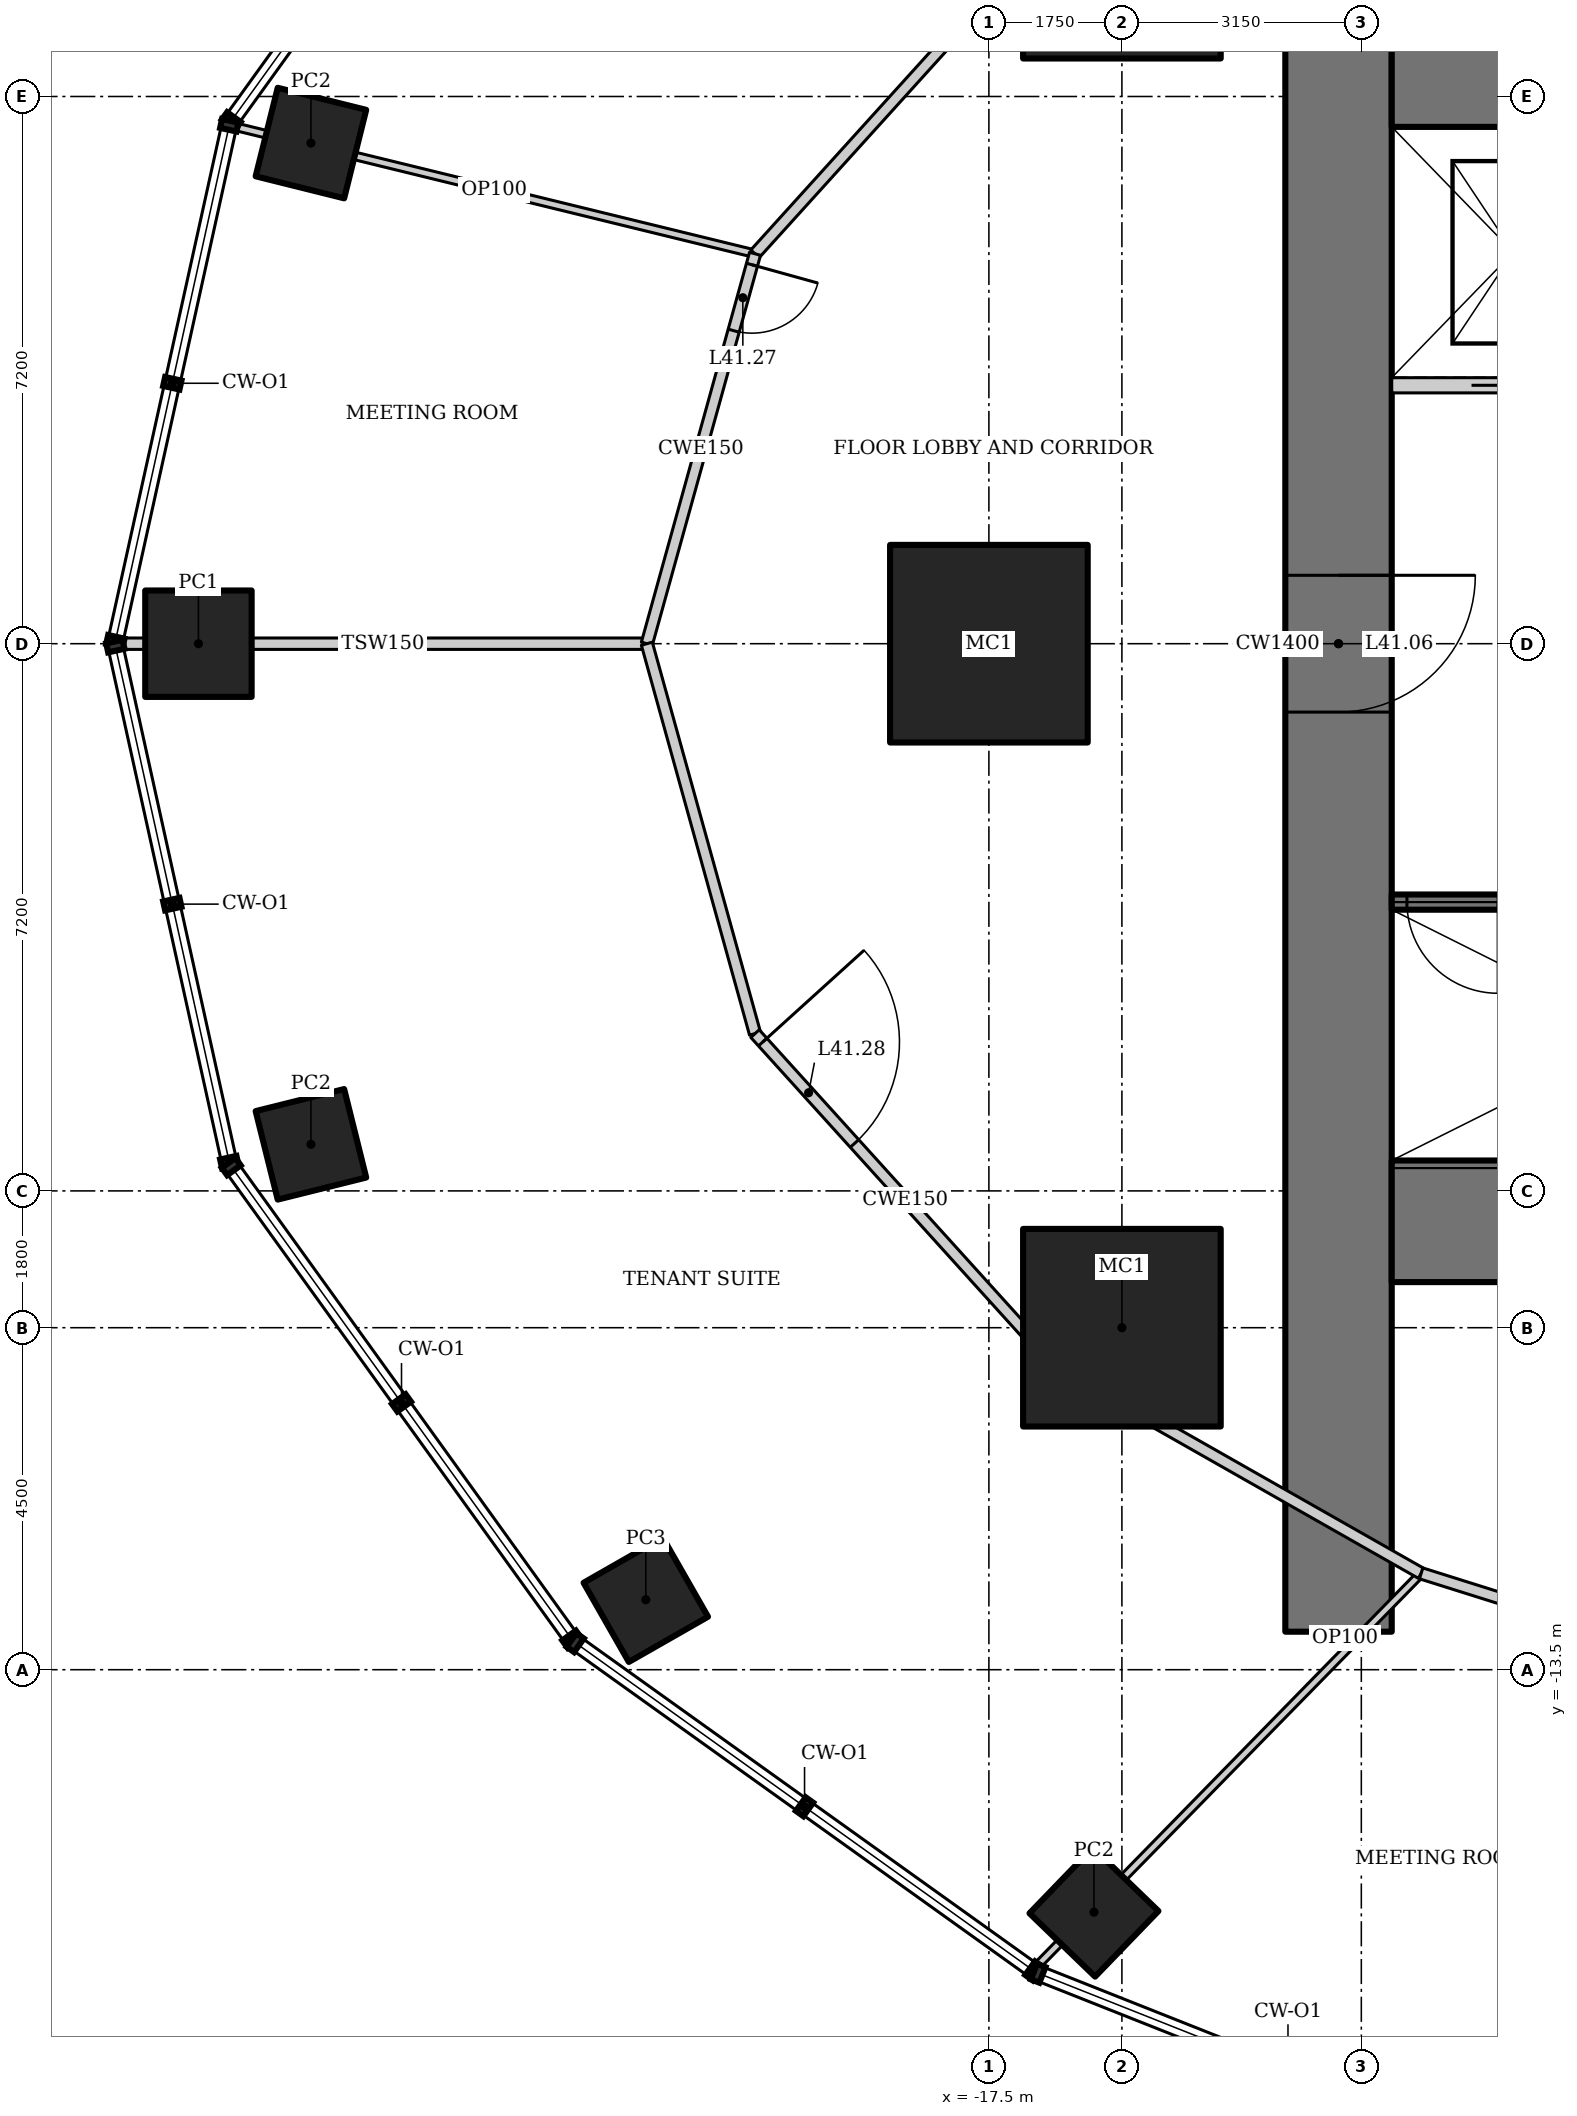
"""IFC4 building model, lengths in metres.
Left out: names, types, materials, properties, quantities, classifications, styles, units other than length and angle.
Written with IfcOpenShell. Run it as: python <this file> out.ifc"""

import sys

from ifc_helpers import new_model, si_unit, direction, frame, frame_2d, origin, origin_2d, place, context, subcontext, project, spatial, rectangle, hollow_rectangle, extrude, element, fill, save


model = new_model("IFC4")
c1 = context("Model", 3, precision=1e-05, world=origin(), true_north=direction((0.0, 1.0)))
c2 = subcontext(c1, "Body", "Model", "MODEL_VIEW")
j1 = project(units=[si_unit("LENGTHUNIT", "METRE"), si_unit("PLANEANGLEUNIT", "RADIAN")], contexts=[c1])
p1 = place(None, origin())
s1 = spatial("IfcSite", under=j1, at=p1, CompositionType="ELEMENT")
p2 = place(p1, origin())
s2 = spatial("IfcBuilding", under=s1, at=p2, CompositionType="ELEMENT")
p3 = place(p2, frame((0.0, 0.0, 176.2)))
s3 = spatial("IfcBuildingStorey", under=s2, at=p3, CompositionType="ELEMENT", Elevation=176.2)
for number, where, z_axis, x_axis in (
    (1, (-15.75, 9.0, 0.0), (0.0, 0.0, 1.0), (1.0, 0.0, 0.0)),
    (2, (-17.5, 0.0, 0.0), (0.0, 0.0, 1.0), (1.0, 0.0, 0.0)),
    (3, (-15.75, -9.0, 0.0), (0.0, 0.0, 1.0), (1.0, 0.0, 0.0)),
):
    element("IfcColumn", number, at=place(p3, frame(where, z_axis=z_axis, x_axis=x_axis)), inside=s3, PredefinedType="COLUMN", context=c2, shape_type="SweptSolid", body=[
        extrude(hollow_rectangle(XDim=2.6, YDim=2.6, WallThickness=0.13, at=origin_2d()), origin(), (0.0, 0.0, 1.0), 4.2),
    ])
p4 = place(p3, frame((-26.42, 6.587, 0.0), z_axis=(0.0, 0.0, 1.0), x_axis=(0.2419218956, 0.970295726276, 0.0)))
e4 = element("IfcColumn", 4, at=p4, inside=s3, PredefinedType="COLUMN", context=c2, shape_type="SweptSolid", body=[
    extrude(hollow_rectangle(XDim=1.2, YDim=1.2, WallThickness=0.1, at=origin_2d()), origin(), (0.0, 0.0, 1.0), 4.2),
])
p5 = place(p3, frame((-27.9, 0.0, 0.0), z_axis=(0.0, 0.0, 1.0), x_axis=(1.0, 0.0, 0.0)))
e5 = element("IfcColumn", 5, at=p5, inside=s3, PredefinedType="COLUMN", context=c2, shape_type="SweptSolid", body=[
    extrude(hollow_rectangle(XDim=1.4, YDim=1.4, WallThickness=0.1, at=origin_2d()), origin(), (0.0, 0.0, 1.0), 4.2),
])
p6 = place(p3, frame((-26.42, -6.587, 0.0), z_axis=(0.0, 0.0, 1.0), x_axis=(0.970295726276, 0.2419218956, 0.0)))
e6 = element("IfcColumn", 6, at=p6, inside=s3, PredefinedType="COLUMN", context=c2, shape_type="SweptSolid", body=[
    extrude(hollow_rectangle(XDim=1.2, YDim=1.2, WallThickness=0.1, at=origin_2d()), origin(), (0.0, 0.0, 1.0), 4.2),
])
p7 = place(p3, frame((-22.014, -12.579, 0.0), z_axis=(0.0, 0.0, 1.0), x_axis=(0.86824298017, 0.496139221777, 0.0)))
e7 = element("IfcColumn", 7, at=p7, inside=s3, PredefinedType="COLUMN", context=c2, shape_type="SweptSolid", body=[
    extrude(hollow_rectangle(XDim=1.2, YDim=1.2, WallThickness=0.12, at=origin_2d()), origin(), (0.0, 0.0, 1.0), 4.2),
])
p8 = place(p3, frame((-16.118, -16.69, 0.0), z_axis=(0.0, 0.0, 1.0), x_axis=(0.694658370459, 0.719339800339, 0.0)))
e8 = element("IfcColumn", 8, at=p8, inside=s3, PredefinedType="COLUMN", context=c2, shape_type="SweptSolid", body=[
    extrude(hollow_rectangle(XDim=1.2, YDim=1.2, WallThickness=0.1, at=origin_2d()), origin(), (0.0, 0.0, 1.0), 4.2),
])
p9 = place(p3, frame((-12.9, 13.0, 0.0), z_axis=(0.0, 0.0, 1.0), x_axis=(0.0, -1.0, 0.0)))
e9 = element("IfcWall", 9, at=p9, inside=s3, PredefinedType="SHEAR", context=c2, shape_type="SweptSolid", body=[
    extrude(rectangle(XDim=26.0, YDim=1.4, at=frame_2d((13.0, 0.0))), origin(), (0.0, 0.0, 1.0), 4.2),
])
p10 = place(p9, frame((12.1, 0.0, 0.0)))
e10 = element("IfcOpeningElement", 10, at=p10, cuts=e9, PredefinedType="OPENING", context=c2, shape_type="SweptSolid", body=[
    extrude(rectangle(XDim=1.8, YDim=2.1, at=frame_2d((0.9, 1.05))), frame((0.0, 0.71, 0.0), z_axis=(0.0, -1.0, 0.0), x_axis=(1.0, 0.0, 0.0)), (0.0, 0.0, 1.0), 1.42),
])
for number, where, z_axis, x_axis in (
    (11, (-12.2, -7.6, 0.0), (0.0, 0.0, 1.0), (1.0, 0.0, 0.0)),
    (12, (12.2, 7.6, 0.0), (0.0, 0.0, 1.0), (-1.0, 0.0, 0.0)),
):
    element("IfcWall", number, at=place(p3, frame(where, z_axis=z_axis, x_axis=x_axis)), inside=s3, PredefinedType="SHEAR", context=c2, shape_type="SweptSolid", body=[
        extrude(rectangle(XDim=24.4, YDim=1.6, at=frame_2d((12.2, 0.0))), origin(), (0.0, 0.0, 1.0), 4.2),
    ])
p11 = place(p3, frame((-5.6, -3.4, 0.0), z_axis=(0.0, 0.0, 1.0), x_axis=(-1.0, 0.0, 0.0)))
e13 = element("IfcWall", 13, at=p11, inside=s3, PredefinedType="SHEAR", context=c2, shape_type="SweptSolid", body=[
    extrude(rectangle(XDim=6.6, YDim=0.2, at=frame_2d((3.3, 0.0))), origin(), (0.0, 0.0, 1.0), 4.2),
])
p12 = place(p11, frame((5.2, 0.0, 0.0)))
e14 = element("IfcOpeningElement", 14, at=p12, cuts=e13, PredefinedType="OPENING", context=c2, shape_type="SweptSolid", body=[
    extrude(rectangle(XDim=1.2, YDim=2.1, at=frame_2d((0.6, 1.05))), frame((0.0, 0.11, 0.0), z_axis=(0.0, -1.0, 0.0), x_axis=(1.0, 0.0, 0.0)), (0.0, 0.0, 1.0), 0.22),
])
p13 = place(p3, frame((-12.2, 3.4, 0.0), z_axis=(0.0, 0.0, 1.0), x_axis=(1.0, 0.0, 0.0)))
e15 = element("IfcWall", 15, at=p13, inside=s3, PredefinedType="SOLIDWALL", context=c2, shape_type="SweptSolid", body=[
    extrude(rectangle(XDim=6.6, YDim=0.2, at=frame_2d((3.3, 0.0))), origin(), (0.0, 0.0, 1.0), 4.2),
])
p14 = place(p13, frame((1.05, 0.0, 0.0)))
e16 = element("IfcOpeningElement", 16, at=p14, cuts=e15, PredefinedType="OPENING", context=c2, shape_type="SweptSolid", body=[
    extrude(rectangle(XDim=1.1, YDim=2.2, at=frame_2d((0.55, 1.1))), frame((0.0, 0.11, 0.0), z_axis=(0.0, -1.0, 0.0), x_axis=(1.0, 0.0, 0.0)), (0.0, 0.0, 1.0), 0.22),
])
p15 = place(p13, frame((4.3, 0.0, 0.0)))
e17 = element("IfcOpeningElement", 17, at=p15, cuts=e15, PredefinedType="OPENING", context=c2, shape_type="SweptSolid", body=[
    extrude(rectangle(XDim=1.4, YDim=2.2, at=frame_2d((0.7, 1.1))), frame((0.0, 0.11, 0.0), z_axis=(0.0, -1.0, 0.0), x_axis=(1.0, 0.0, 0.0)), (0.0, 0.0, 1.0), 0.22),
])
p16 = place(p3, frame((-27.441, 6.809, 0.0), z_axis=(0.0, 0.0, 1.0), x_axis=(0.971377572955, -0.237540755996, 0.0)))
e18 = element("IfcWall", 18, at=p16, inside=s3, PredefinedType="PARTITIONING", context=c2, shape_type="SweptSolid", body=[
    extrude(rectangle(XDim=7.066, YDim=0.1, at=frame_2d((3.533, 0.0))), origin(), (0.0, 0.0, 1.0), 3.113),
])
p17 = place(p3, frame((-28.944, 0.0, 0.0), z_axis=(0.0, 0.0, 1.0), x_axis=(1.0, 0.0, 0.0)))
e19 = element("IfcWall", 19, at=p17, inside=s3, PredefinedType="PARTITIONING", context=c2, shape_type="SweptSolid", body=[
    extrude(rectangle(XDim=6.944, YDim=0.15, at=frame_2d((3.472, 0.0))), origin(), (0.0, 0.0, 1.0), 3.204),
])
p18 = place(p3, frame((-16.882, -17.414, 0.0), z_axis=(0.0, 0.0, 1.0), x_axis=(0.699352142517, 0.714777294517, 0.0)))
e20 = element("IfcWall", 20, at=p18, inside=s3, PredefinedType="PARTITIONING", context=c2, shape_type="SweptSolid", body=[
    extrude(rectangle(XDim=7.249, YDim=0.1, at=frame_2d((3.625, 0.0))), origin(), (0.0, 0.0, 1.0), 3.321),
])
p19 = place(p3, frame((-16.623, 9.499, 0.0), z_axis=(0.0, 0.0, 1.0), x_axis=(-0.671118353743, -0.741350224435, 0.0)))
e21 = element("IfcWall", 21, at=p19, inside=s3, PredefinedType="PARTITIONING", context=c2, shape_type="SweptSolid", body=[
    extrude(rectangle(XDim=5.892, YDim=0.15, at=frame_2d((2.946, 0.0))), origin(), (0.0, 0.0, 1.0), 4.05),
])
p20 = place(p3, frame((-20.577, 5.13, 0.0), z_axis=(0.0, 0.0, 1.0), x_axis=(-0.267293817428, -0.963615076244, 0.0)))
e22 = element("IfcWall", 22, at=p20, inside=s3, PredefinedType="PARTITIONING", context=c2, shape_type="SweptSolid", body=[
    extrude(rectangle(XDim=5.324, YDim=0.15, at=frame_2d((2.662, 0.0))), origin(), (0.0, 0.0, 1.0), 4.05),
])
p21 = place(p20, frame((0.15, 0.0, 0.0)))
e23 = element("IfcOpeningElement", 23, at=p21, cuts=e22, PredefinedType="OPENING", context=c2, shape_type="SweptSolid", body=[
    extrude(rectangle(XDim=0.9, YDim=2.1, at=frame_2d((0.45, 1.05))), frame((0.0, 0.085, 0.0), z_axis=(0.0, -1.0, 0.0), x_axis=(1.0, 0.0, 0.0)), (0.0, 0.0, 1.0), 0.17),
])
p22 = place(p3, frame((-22.0, 0.0, 0.0), z_axis=(0.0, 0.0, 1.0), x_axis=(0.267293817428, -0.963615076244, 0.0)))
e24 = element("IfcWall", 24, at=p22, inside=s3, PredefinedType="PARTITIONING", context=c2, shape_type="SweptSolid", body=[
    extrude(rectangle(XDim=5.324, YDim=0.15, at=frame_2d((2.662, 0.0))), origin(), (0.0, 0.0, 1.0), 4.05),
])
p23 = place(p3, frame((-20.577, -5.13, 0.0), z_axis=(0.0, 0.0, 1.0), x_axis=(0.671118353743, -0.741350224435, 0.0)))
e25 = element("IfcWall", 25, at=p23, inside=s3, PredefinedType="PARTITIONING", context=c2, shape_type="SweptSolid", body=[
    extrude(rectangle(XDim=5.892, YDim=0.15, at=frame_2d((2.946, 0.0))), origin(), (0.0, 0.0, 1.0), 4.05),
])
p24 = place(p23, frame((0.15, 0.0, 0.0)))
e26 = element("IfcOpeningElement", 26, at=p24, cuts=e25, PredefinedType="OPENING", context=c2, shape_type="SweptSolid", body=[
    extrude(rectangle(XDim=1.8, YDim=2.1, at=frame_2d((0.9, 1.05))), frame((0.0, 0.085, 0.0), z_axis=(0.0, -1.0, 0.0), x_axis=(1.0, 0.0, 0.0)), (0.0, 0.0, 1.0), 0.17),
])
p25 = place(p3, frame((-16.623, -9.499, 0.0), z_axis=(0.0, 0.0, 1.0), x_axis=(0.869375991036, -0.494151177485, 0.0)))
e27 = element("IfcWall", 27, at=p25, inside=s3, PredefinedType="PARTITIONING", context=c2, shape_type="SweptSolid", body=[
    extrude(rectangle(XDim=5.532, YDim=0.15, at=frame_2d((2.766, 0.0))), origin(), (0.0, 0.0, 1.0), 4.05),
])
p26 = place(p3, frame((-11.813, -12.232, 0.0), z_axis=(0.0, 0.0, 1.0), x_axis=(0.953893934057, -0.300143903101, 0.0)))
e28 = element("IfcWall", 28, at=p26, inside=s3, PredefinedType="PARTITIONING", context=c2, shape_type="SweptSolid", body=[
    extrude(rectangle(XDim=5.042, YDim=0.15, at=frame_2d((2.521, 0.0))), origin(), (0.0, 0.0, 1.0), 4.05),
])
p27 = place(p26, frame((2.98, 0.0, 0.0)))
e29 = element("IfcOpeningElement", 29, at=p27, cuts=e28, PredefinedType="OPENING", context=c2, shape_type="SweptSolid", body=[
    extrude(rectangle(XDim=0.9, YDim=2.1, at=frame_2d((0.45, 1.05))), frame((0.0, 0.085, 0.0), z_axis=(0.0, -1.0, 0.0), x_axis=(1.0, 0.0, 0.0)), (0.0, 0.0, 1.0), 0.17),
])
p28 = place(p3, frame((-12.9, -13.0, 0.0), z_axis=(0.0, 0.0, 1.0), x_axis=(0.714690391061, -0.699440951707, 0.0)))
e30 = element("IfcWall", 30, at=p28, inside=s3, PredefinedType="PARTITIONING", context=c2, shape_type="SweptSolid", body=[
    extrude(rectangle(XDim=0.24, YDim=0.1, at=frame_2d((0.12, 0.0))), origin(), (0.0, 0.0, 1.0), 4.05),
])
p29 = place(p12, origin())
e31 = element("IfcDoor", 31, at=p29, inside=s3, OperationType="SINGLE_SWING_RIGHT", PredefinedType="DOOR", context=c2, shape_type="SweptSolid", body=[
    extrude(rectangle(XDim=1.2, YDim=2.1, at=frame_2d((0.6, 1.05))), frame((0.0, 0.025, 0.0), z_axis=(0.0, -1.0, 0.0), x_axis=(1.0, 0.0, 0.0)), (0.0, 0.0, 1.0), 0.05),
])
fill(e14, e31)
p30 = place(p10, origin())
e32 = element("IfcDoor", 32, at=p30, inside=s3, OperationType="DOUBLE_DOOR_DOUBLE_SWING", PredefinedType="DOOR", context=c2, shape_type="SweptSolid", body=[
    extrude(rectangle(XDim=1.8, YDim=2.1, at=frame_2d((0.9, 1.05))), frame((0.0, 0.025, 0.0), z_axis=(0.0, -1.0, 0.0), x_axis=(1.0, 0.0, 0.0)), (0.0, 0.0, 1.0), 0.05),
])
fill(e10, e32)
p31 = place(p14, origin())
e33 = element("IfcDoor", 33, at=p31, inside=s3, OperationType="DOUBLE_DOOR_SLIDING", PredefinedType="DOOR", context=c2, shape_type="SweptSolid", body=[
    extrude(rectangle(XDim=1.1, YDim=2.2, at=frame_2d((0.55, 1.1))), frame((0.0, 0.025, 0.0), z_axis=(0.0, -1.0, 0.0), x_axis=(1.0, 0.0, 0.0)), (0.0, 0.0, 1.0), 0.05),
])
fill(e16, e33)
p32 = place(p21, origin())
e34 = element("IfcDoor", 34, at=p32, inside=s3, OperationType="SINGLE_SWING_LEFT", PredefinedType="DOOR", context=c2, shape_type="SweptSolid", body=[
    extrude(rectangle(XDim=0.9, YDim=2.1, at=frame_2d((0.45, 1.05))), frame((0.0, 0.025, 0.0), z_axis=(0.0, -1.0, 0.0), x_axis=(1.0, 0.0, 0.0)), (0.0, 0.0, 1.0), 0.05),
])
fill(e23, e34)
p33 = place(p24, origin())
e35 = element("IfcDoor", 35, at=p33, inside=s3, OperationType="DOUBLE_DOOR_DOUBLE_SWING", PredefinedType="DOOR", context=c2, shape_type="SweptSolid", body=[
    extrude(rectangle(XDim=1.8, YDim=2.1, at=frame_2d((0.9, 1.05))), frame((0.0, 0.025, 0.0), z_axis=(0.0, -1.0, 0.0), x_axis=(1.0, 0.0, 0.0)), (0.0, 0.0, 1.0), 0.05),
])
fill(e26, e35)
save(model, sys.argv[1])
